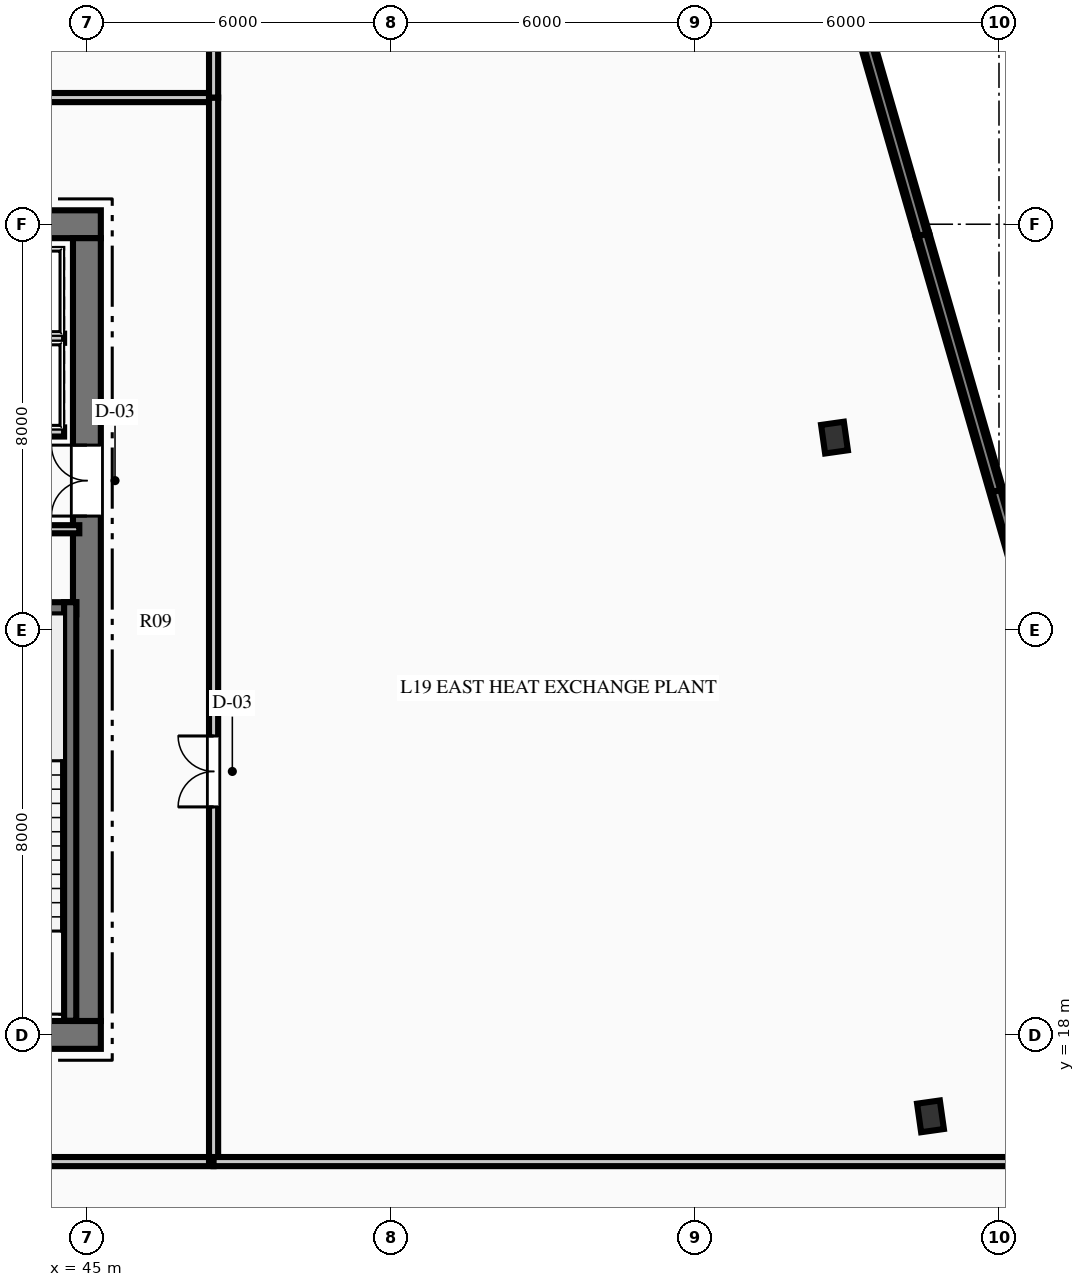
"""IFC4 building model, lengths in metres.
Left out: names, types, materials, properties, quantities, classifications, styles, units other than length and angle.
Written with IfcOpenShell. Run it as: python <this file> out.ifc"""

import sys

from ifc_helpers import new_model, si_unit, direction, frame, frame_2d, origin, origin_2d, place, context, subcontext, project, spatial, rectangle, i_section, extrude, element, fill, save


model = new_model("IFC4")
c1 = context("Model", 3, precision=1e-05, world=origin(), true_north=direction((0.0, 1.0)))
c2 = subcontext(c1, "Body", "Model", "MODEL_VIEW")
j1 = project(units=[si_unit("LENGTHUNIT", "METRE"), si_unit("PLANEANGLEUNIT", "RADIAN")], contexts=[c1])
p1 = place(None, origin())
s1 = spatial("IfcSite", under=j1, at=p1, CompositionType="ELEMENT")
p2 = place(p1, origin())
s2 = spatial("IfcBuilding", under=s1, at=p2, CompositionType="ELEMENT")
p3 = place(p2, frame((0.0, 0.0, 81.45)))
s3 = spatial("IfcBuildingStorey", under=s2, at=p3, CompositionType="ELEMENT", Elevation=81.45)
p4 = place(p3, frame((26.725, 18.0, 0.0), z_axis=(0.0, 0.0, 1.0), x_axis=(1.0, 0.0, 0.0)))
e1 = element("IfcWall", 1, at=p4, inside=s3, PredefinedType="SHEAR", context=c2, shape_type="SweptSolid", body=[
    extrude(rectangle(XDim=18.55, YDim=0.55, at=frame_2d((9.275, 0.0))), origin(), (0.0, 0.0, 1.0), 4.5),
])
p5 = place(p4, frame((7.375, 0.0, 0.0)))
e2 = element("IfcOpeningElement", 2, at=p5, cuts=e1, PredefinedType="OPENING", context=c2, shape_type="SweptSolid", body=[
    extrude(rectangle(XDim=1.1, YDim=2.15, at=frame_2d((0.55, 1.075))), frame((0.0, 0.285, 0.0), z_axis=(0.0, -1.0, 0.0), x_axis=(1.0, 0.0, 0.0)), (0.0, 0.0, 1.0), 0.57),
])
p6 = place(p4, frame((10.075, 0.0, 0.0)))
e3 = element("IfcOpeningElement", 3, at=p6, cuts=e1, PredefinedType="OPENING", context=c2, shape_type="SweptSolid", body=[
    extrude(rectangle(XDim=1.1, YDim=2.15, at=frame_2d((0.55, 1.075))), frame((0.0, 0.285, 0.0), z_axis=(0.0, -1.0, 0.0), x_axis=(1.0, 0.0, 0.0)), (0.0, 0.0, 1.0), 0.57),
])
p7 = place(p3, frame((26.725, 34.0, 0.0), z_axis=(0.0, 0.0, 1.0), x_axis=(1.0, 0.0, 0.0)))
e4 = element("IfcWall", 4, at=p7, inside=s3, PredefinedType="SHEAR", context=c2, shape_type="SweptSolid", body=[
    extrude(rectangle(XDim=18.55, YDim=0.55, at=frame_2d((9.275, 0.0))), origin(), (0.0, 0.0, 1.0), 4.5),
])
p8 = place(p7, frame((5.57, 0.0, 0.0)))
e5 = element("IfcOpeningElement", 5, at=p8, cuts=e4, PredefinedType="OPENING", context=c2, shape_type="SweptSolid", body=[
    extrude(rectangle(XDim=1.05, YDim=2.15, at=frame_2d((0.525, 1.075))), frame((0.0, 0.285, 0.0), z_axis=(0.0, -1.0, 0.0), x_axis=(1.0, 0.0, 0.0)), (0.0, 0.0, 1.0), 0.57),
])
p9 = place(p7, frame((1.24, 0.0, 0.0)))
e6 = element("IfcOpeningElement", 6, at=p9, cuts=e4, PredefinedType="OPENING", context=c2, shape_type="SweptSolid", body=[
    extrude(rectangle(XDim=1.1, YDim=2.15, at=frame_2d((0.55, 1.075))), frame((0.0, 0.285, 0.0), z_axis=(0.0, -1.0, 0.0), x_axis=(1.0, 0.0, 0.0)), (0.0, 0.0, 1.0), 0.57),
])
p10 = place(p7, frame((3.49, 0.0, 0.0)))
e7 = element("IfcOpeningElement", 7, at=p10, cuts=e4, PredefinedType="OPENING", context=c2, shape_type="SweptSolid", body=[
    extrude(rectangle(XDim=1.1, YDim=2.15, at=frame_2d((0.55, 1.075))), frame((0.0, 0.285, 0.0), z_axis=(0.0, -1.0, 0.0), x_axis=(1.0, 0.0, 0.0)), (0.0, 0.0, 1.0), 0.57),
])
p11 = place(p7, frame((13.96, 0.0, 0.0)))
e8 = element("IfcOpeningElement", 8, at=p11, cuts=e4, PredefinedType="OPENING", context=c2, shape_type="SweptSolid", body=[
    extrude(rectangle(XDim=1.1, YDim=2.15, at=frame_2d((0.55, 1.075))), frame((0.0, 0.285, 0.0), z_axis=(0.0, -1.0, 0.0), x_axis=(1.0, 0.0, 0.0)), (0.0, 0.0, 1.0), 0.57),
])
p12 = place(p7, frame((16.21, 0.0, 0.0)))
e9 = element("IfcOpeningElement", 9, at=p12, cuts=e4, PredefinedType="OPENING", context=c2, shape_type="SweptSolid", body=[
    extrude(rectangle(XDim=1.1, YDim=2.15, at=frame_2d((0.55, 1.075))), frame((0.0, 0.285, 0.0), z_axis=(0.0, -1.0, 0.0), x_axis=(1.0, 0.0, 0.0)), (0.0, 0.0, 1.0), 0.57),
])
p13 = place(p3, frame((45.0, 18.275, 0.0), z_axis=(0.0, 0.0, 1.0), x_axis=(0.0, 1.0, 0.0)))
e10 = element("IfcWall", 10, at=p13, inside=s3, PredefinedType="SHEAR", context=c2, shape_type="SweptSolid", body=[
    extrude(rectangle(XDim=15.45, YDim=0.55, at=frame_2d((7.725, 0.0))), origin(), (0.0, 0.0, 1.0), 4.5),
])
p14 = place(p13, frame((9.965, 0.0, 0.0)))
e11 = element("IfcOpeningElement", 11, at=p14, cuts=e10, PredefinedType="OPENING", context=c2, shape_type="SweptSolid", body=[
    extrude(rectangle(XDim=1.4, YDim=2.2, at=frame_2d((0.7, 1.1))), frame((0.0, 0.285, 0.0), z_axis=(0.0, -1.0, 0.0), x_axis=(1.0, 0.0, 0.0)), (0.0, 0.0, 1.0), 0.57),
])
p15 = place(p3, frame((40.81, 26.42, 0.0), z_axis=(0.0, 0.0, 1.0), x_axis=(1.0, 0.0, 0.0)))
e12 = element("IfcWall", 12, at=p15, inside=s3, PredefinedType="SHEAR", context=c2, shape_type="SweptSolid", body=[
    extrude(rectangle(XDim=3.98, YDim=0.24, at=frame_2d((1.99, 0.0))), origin(), (0.0, 0.0, 1.0), 4.5),
])
p16 = place(p3, frame((44.67, 18.28, 0.0), z_axis=(0.0, 0.0, 1.0), x_axis=(0.0, 1.0, 0.0)))
e13 = element("IfcWall", 13, at=p16, inside=s3, PredefinedType="SHEAR", context=c2, shape_type="SweptSolid", body=[
    extrude(rectangle(XDim=8.26, YDim=0.24, at=frame_2d((4.13, 0.0))), origin(), (0.0, 0.0, 1.0), 4.5),
])
for number, where, z_axis, x_axis in (
    (14, (61.648, 16.393, 0.0), (0.0, 0.0, 1.0), (0.99, 0.14, 0.0)),
    (15, (59.753, 29.789, 0.0), (0.0, 0.0, 1.0), (0.99, 0.14, 0.0)),
):
    element("IfcColumn", number, at=place(p3, frame(where, z_axis=z_axis, x_axis=x_axis)), inside=s3, PredefinedType="COLUMN", context=c2, shape_type="SweptSolid", body=[
        extrude(i_section(OverallWidth=0.454, OverallDepth=0.569, WebThickness=0.078, FlangeThickness=0.125, at=origin_2d()), origin(), (0.0, 0.0, 1.0), 4.5),
    ])
p17 = place(p3, frame((55.656, 53.999, 0.0), z_axis=(0.0, 0.0, 1.0), x_axis=(0.277313521824, -0.960779480741, 0.0)))
e16 = element("IfcWall", 16, at=p17, inside=s3, PredefinedType="STANDARD", context=c2, shape_type="SweptSolid", body=[
    extrude(rectangle(XDim=21.038, YDim=0.28, at=frame_2d((10.519, 0.0))), origin(), (0.0, 0.0, 1.0), 1.15),
])
p18 = place(p3, frame((61.49, 33.787, 0.0), z_axis=(0.0, 0.0, 1.0), x_axis=(0.277316613865, -0.960778588268, 0.0)))
e17 = element("IfcWall", 17, at=p18, inside=s3, PredefinedType="STANDARD", context=c2, shape_type="SweptSolid", body=[
    extrude(rectangle(XDim=21.037, YDim=0.28, at=frame_2d((10.519, 0.0))), origin(), (0.0, 0.0, 1.0), 1.15),
])
p19 = place(p3, frame((40.8, 27.98, 0.0), z_axis=(0.0, 0.0, 1.0), x_axis=(1.0, 0.0, 0.0)))
e18 = element("IfcWall", 18, at=p19, inside=s3, PredefinedType="PARTITIONING", context=c2, shape_type="SweptSolid", body=[
    extrude(rectangle(XDim=4.05, YDim=0.16, at=frame_2d((2.025, 0.0))), origin(), (0.0, 0.0, 1.0), 4.09),
])
p20 = place(p19, frame((1.475, 0.0, 0.0)))
e19 = element("IfcOpeningElement", 19, at=p20, cuts=e18, PredefinedType="OPENING", context=c2, shape_type="SweptSolid", body=[
    extrude(rectangle(XDim=0.95, YDim=2.15, at=frame_2d((0.475, 1.075))), frame((0.0, 0.09, 0.0), z_axis=(0.0, -1.0, 0.0), x_axis=(1.0, 0.0, 0.0)), (0.0, 0.0, 1.0), 0.18),
])
p21 = place(p3, frame((40.12, 29.9, 0.0), z_axis=(0.0, 0.0, 1.0), x_axis=(1.0, 0.0, 0.0)))
e20 = element("IfcWall", 20, at=p21, inside=s3, PredefinedType="PARTITIONING", context=c2, shape_type="SweptSolid", body=[
    extrude(rectangle(XDim=4.43, YDim=0.18, at=frame_2d((2.215, 0.0))), origin(), (0.0, 0.0, 1.0), 4.09),
])
p22 = place(p21, frame((0.565, 0.0, 0.0)))
e21 = element("IfcOpeningElement", 21, at=p22, cuts=e20, PredefinedType="OPENING", context=c2, shape_type="SweptSolid", body=[
    extrude(rectangle(XDim=1.1, YDim=2.15, at=frame_2d((0.55, 1.075))), frame((0.0, 0.1, 0.0), z_axis=(0.0, -1.0, 0.0), x_axis=(1.0, 0.0, 0.0)), (0.0, 0.0, 1.0), 0.2),
])
p23 = place(p21, frame((2.815, 0.0, 0.0)))
e22 = element("IfcOpeningElement", 22, at=p23, cuts=e20, PredefinedType="OPENING", context=c2, shape_type="SweptSolid", body=[
    extrude(rectangle(XDim=1.1, YDim=2.15, at=frame_2d((0.55, 1.075))), frame((0.0, 0.1, 0.0), z_axis=(0.0, -1.0, 0.0), x_axis=(1.0, 0.0, 0.0)), (0.0, 0.0, 1.0), 0.2),
])
p24 = place(p3, frame((40.12, 31.75, 0.0), z_axis=(0.0, 0.0, 1.0), x_axis=(1.0, 0.0, 0.0)))
e23 = element("IfcWall", 23, at=p24, inside=s3, PredefinedType="PARTITIONING", context=c2, shape_type="SweptSolid", body=[
    extrude(rectangle(XDim=4.43, YDim=0.18, at=frame_2d((2.215, 0.0))), origin(), (0.0, 0.0, 1.0), 4.09),
])
p25 = place(p3, frame((24.5, 15.5, 0.0), z_axis=(0.0, 0.0, 1.0), x_axis=(1.0, 0.0, 0.0)))
e24 = element("IfcWall", 24, at=p25, inside=s3, PredefinedType="PARTITIONING", context=c2, shape_type="SweptSolid", body=[
    extrude(rectangle(XDim=23.0, YDim=0.18, at=frame_2d((11.5, 0.0))), origin(), (0.0, 0.0, 1.0), 4.09),
])
p26 = place(p25, frame((7.15, 0.0, 0.0)))
e25 = element("IfcOpeningElement", 25, at=p26, cuts=e24, PredefinedType="OPENING", context=c2, shape_type="SweptSolid", body=[
    extrude(rectangle(XDim=1.1, YDim=2.15, at=frame_2d((0.55, 1.075))), frame((0.0, 0.1, 0.0), z_axis=(0.0, -1.0, 0.0), x_axis=(1.0, 0.0, 0.0)), (0.0, 0.0, 1.0), 0.2),
])
p27 = place(p25, frame((14.75, 0.0, 0.0)))
e26 = element("IfcOpeningElement", 26, at=p27, cuts=e24, PredefinedType="OPENING", context=c2, shape_type="SweptSolid", body=[
    extrude(rectangle(XDim=1.1, YDim=2.15, at=frame_2d((0.55, 1.075))), frame((0.0, 0.1, 0.0), z_axis=(0.0, -1.0, 0.0), x_axis=(1.0, 0.0, 0.0)), (0.0, 0.0, 1.0), 0.2),
])
p28 = place(p3, frame((24.5, 36.5, 0.0), z_axis=(0.0, 0.0, 1.0), x_axis=(1.0, 0.0, 0.0)))
e27 = element("IfcWall", 27, at=p28, inside=s3, PredefinedType="PARTITIONING", context=c2, shape_type="SweptSolid", body=[
    extrude(rectangle(XDim=23.0, YDim=0.18, at=frame_2d((11.5, 0.0))), origin(), (0.0, 0.0, 1.0), 4.09),
])
p29 = place(p28, frame((7.15, 0.0, 0.0)))
e28 = element("IfcOpeningElement", 28, at=p29, cuts=e27, PredefinedType="OPENING", context=c2, shape_type="SweptSolid", body=[
    extrude(rectangle(XDim=1.1, YDim=2.15, at=frame_2d((0.55, 1.075))), frame((0.0, 0.1, 0.0), z_axis=(0.0, -1.0, 0.0), x_axis=(1.0, 0.0, 0.0)), (0.0, 0.0, 1.0), 0.2),
])
p30 = place(p28, frame((14.75, 0.0, 0.0)))
e29 = element("IfcOpeningElement", 29, at=p30, cuts=e27, PredefinedType="OPENING", context=c2, shape_type="SweptSolid", body=[
    extrude(rectangle(XDim=1.1, YDim=2.15, at=frame_2d((0.55, 1.075))), frame((0.0, 0.1, 0.0), z_axis=(0.0, -1.0, 0.0), x_axis=(1.0, 0.0, 0.0)), (0.0, 0.0, 1.0), 0.2),
])
p31 = place(p3, frame((47.5, 15.5, 0.0), z_axis=(0.0, 0.0, 1.0), x_axis=(0.0, 1.0, 0.0)))
e30 = element("IfcWall", 30, at=p31, inside=s3, PredefinedType="PARTITIONING", context=c2, shape_type="SweptSolid", body=[
    extrude(rectangle(XDim=21.0, YDim=0.18, at=frame_2d((10.5, 0.0))), origin(), (0.0, 0.0, 1.0), 4.09),
])
p32 = place(p31, frame((7.0, 0.0, 0.0)))
e31 = element("IfcOpeningElement", 31, at=p32, cuts=e30, PredefinedType="OPENING", context=c2, shape_type="SweptSolid", body=[
    extrude(rectangle(XDim=1.4, YDim=2.2, at=frame_2d((0.7, 1.1))), frame((0.0, 0.1, 0.0), z_axis=(0.0, -1.0, 0.0), x_axis=(1.0, 0.0, 0.0)), (0.0, 0.0, 1.0), 0.2),
])
p33 = place(p3, frame((47.5, 15.5, 0.0), z_axis=(0.0, 0.0, 1.0), x_axis=(1.0, 0.0, 0.0)))
e32 = element("IfcWall", 32, at=p33, inside=s3, PredefinedType="PARTITIONING", context=c2, shape_type="SweptSolid", body=[
    extrude(rectangle(XDim=19.227, YDim=0.18, at=frame_2d((9.614, 0.0))), origin(), (0.0, 0.0, 1.0), 4.09),
])
p34 = place(p3, frame((47.5, 36.5, 0.0), z_axis=(0.0, 0.0, 1.0), x_axis=(0.0, 1.0, 0.0)))
e33 = element("IfcWall", 33, at=p34, inside=s3, PredefinedType="PARTITIONING", context=c2, shape_type="SweptSolid", body=[
    extrude(rectangle(XDim=19.475, YDim=0.18, at=frame_2d((9.737, 0.0))), origin(), (0.0, 0.0, 1.0), 4.09),
])
p35 = place(p14, origin())
e34 = element("IfcDoor", 34, at=p35, inside=s3, OperationType="DOUBLE_DOOR_SINGLE_SWING", PredefinedType="DOOR", context=c2, shape_type="SweptSolid", body=[
    extrude(rectangle(XDim=1.4, YDim=2.2, at=frame_2d((0.7, 1.1))), frame((0.0, 0.025, 0.0), z_axis=(0.0, -1.0, 0.0), x_axis=(1.0, 0.0, 0.0)), (0.0, 0.0, 1.0), 0.05),
])
fill(e11, e34)
p36 = place(p32, origin())
e35 = element("IfcDoor", 35, at=p36, inside=s3, OperationType="DOUBLE_DOOR_SINGLE_SWING", PredefinedType="DOOR", context=c2, shape_type="SweptSolid", body=[
    extrude(rectangle(XDim=1.4, YDim=2.2, at=frame_2d((0.7, 1.1))), frame((0.0, 0.025, 0.0), z_axis=(0.0, -1.0, 0.0), x_axis=(1.0, 0.0, 0.0)), (0.0, 0.0, 1.0), 0.05),
])
fill(e31, e35)
save(model, sys.argv[1])
